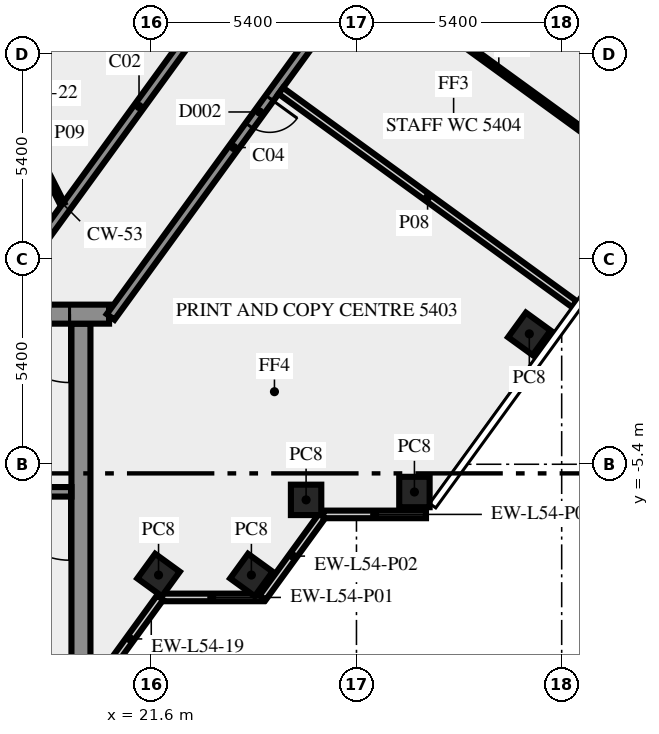
"""IFC4 building model, lengths in metres.
Left out: names, types, materials, properties, quantities, classifications, styles, units other than length and angle.
Written with IfcOpenShell. Run it as: python <this file> out.ifc"""

import sys

from ifc_helpers import new_model, si_unit, direction, frame, frame_2d, origin, origin_2d, place, context, subcontext, project, spatial, rectangle, extrude, element, fill, save


model = new_model("IFC4")
c1 = context("Model", 3, precision=1e-05, world=origin(), true_north=direction((0.0, 1.0)))
c2 = subcontext(c1, "Body", "Model", "MODEL_VIEW")
j1 = project(units=[si_unit("LENGTHUNIT", "METRE"), si_unit("PLANEANGLEUNIT", "RADIAN")], contexts=[c1])
p1 = place(None, origin())
s1 = spatial("IfcSite", under=j1, at=p1, CompositionType="ELEMENT")
p2 = place(p1, origin())
s2 = spatial("IfcBuilding", under=s1, at=p2, CompositionType="ELEMENT")
p3 = place(p2, frame((0.0, 0.0, 230.0)))
s3 = spatial("IfcBuildingStorey", under=s2, at=p3, CompositionType="ELEMENT", Elevation=230.0)
for number, where, z_axis, x_axis in (
    (1, (21.792, -8.315, 0.0), (0.0, 0.0, 1.0), (0.588, 0.809, 0.0)),
    (2, (24.235, -8.315, 0.0), (0.0, 0.0, 1.0), (0.588, 0.809, 0.0)),
    (3, (25.674, -6.337, 0.0), (0.0, 0.0, 1.0), (1.0, 0.0, 0.0)),
    (4, (28.525, -6.13, 0.0), (0.0, 0.0, 1.0), (1.0, 0.0, 0.0)),
    (5, (31.548, -1.969, 0.0), (0.0, 0.0, 1.0), (0.588, 0.809, 0.0)),
):
    element("IfcColumn", number, at=place(p3, frame(where, z_axis=z_axis, x_axis=x_axis)), inside=s3, PredefinedType="COLUMN", context=c2, shape_type="SweptSolid", body=[
        extrude(rectangle(XDim=0.8, YDim=0.8, at=origin_2d()), origin(), (0.0, 0.0, 1.0), 3.65),
    ])
p4 = place(p3, frame((21.843, -8.904, 0.0), z_axis=(0.0, 0.0, 1.0), x_axis=(1.0, 0.0, 0.0)))
e6 = element("IfcWall", 6, at=p4, inside=s3, PredefinedType="SOLIDWALL", context=c2, shape_type="SweptSolid", body=[
    extrude(rectangle(XDim=2.7, YDim=0.2, at=frame_2d((1.35, 0.0))), origin(), (0.0, 0.0, 1.0), 3.65),
])
p5 = place(p3, frame((24.533, -8.909, 0.0), z_axis=(0.0, 0.0, 1.0), x_axis=(0.587720002413, 0.809064397168, 0.0)))
e7 = element("IfcWall", 7, at=p5, inside=s3, PredefinedType="SOLIDWALL", context=c2, shape_type="SweptSolid", body=[
    extrude(rectangle(XDim=2.7, YDim=0.2, at=frame_2d((1.35, 0.0))), origin(), (0.0, 0.0, 1.0), 3.65),
])
p6 = place(p3, frame((26.13, -6.719, 0.0), z_axis=(0.0, 0.0, 1.0), x_axis=(1.0, 0.0, 0.0)))
e8 = element("IfcWall", 8, at=p6, inside=s3, PredefinedType="SOLIDWALL", context=c2, shape_type="SweptSolid", body=[
    extrude(rectangle(XDim=2.7, YDim=0.2, at=frame_2d((1.35, 0.0))), origin(), (0.0, 0.0, 1.0), 3.65),
])
p7 = place(p3, frame((20.253, -11.083, 0.0), z_axis=(0.0, 0.0, 1.0), x_axis=(0.587766567315, 0.809030569476, 0.0)))
e9 = element("IfcWall", 9, at=p7, inside=s3, PredefinedType="SOLIDWALL", context=c2, shape_type="SweptSolid", body=[
    extrude(rectangle(XDim=2.688, YDim=0.2, at=frame_2d((1.344, 0.0))), origin(), (0.0, 0.0, 1.0), 3.65),
])
p8 = place(p3, frame((19.75, -10.5, 0.0), z_axis=(0.0, 0.0, 1.0), x_axis=(0.0, 1.0, 0.0)))
e10 = element("IfcWall", 10, at=p8, inside=s3, PredefinedType="SHEAR", context=c2, shape_type="SweptSolid", body=[
    extrude(rectangle(XDim=8.8, YDim=0.5, at=frame_2d((4.4, 0.0))), origin(), (0.0, 0.0, 1.0), 3.65),
])
p9 = place(p3, frame((19.5, -6.125, 0.0), z_axis=(0.0, 0.0, 1.0), x_axis=(-1.0, 0.0, 0.0)))
e11 = element("IfcWall", 11, at=p9, inside=s3, PredefinedType="SHEAR", context=c2, shape_type="SweptSolid", body=[
    extrude(rectangle(XDim=8.05, YDim=0.25, at=frame_2d((4.025, 0.0))), origin(), (0.0, 0.0, 1.0), 3.65),
])
p10 = place(p9, frame((0.05, 0.0, 0.0)))
e12 = element("IfcOpeningElement", 12, at=p10, cuts=e11, PredefinedType="OPENING", context=c2, shape_type="SweptSolid", body=[
    extrude(rectangle(XDim=1.8, YDim=2.1, at=frame_2d((0.9, 1.05))), frame((0.0, 0.135, 0.0), z_axis=(0.0, -1.0, 0.0), x_axis=(1.0, 0.0, 0.0)), (0.0, 0.0, 1.0), 0.27),
])
p11 = place(p3, frame((20.49, -1.45, 0.0), z_axis=(0.0, 0.0, 1.0), x_axis=(-1.0, 0.0, 0.0)))
e13 = element("IfcWall", 13, at=p11, inside=s3, PredefinedType="SHEAR", context=c2, shape_type="SweptSolid", body=[
    extrude(rectangle(XDim=40.98, YDim=0.5, at=frame_2d((20.49, 0.0))), origin(), (0.0, 0.0, 1.0), 3.65),
])
p12 = place(p11, frame((38.14, 0.0, 0.0)))
e14 = element("IfcOpeningElement", 14, at=p12, cuts=e13, PredefinedType="OPENING", context=c2, shape_type="SweptSolid", body=[
    extrude(rectangle(XDim=1.8, YDim=2.1, at=frame_2d((0.9, 1.05))), frame((0.0, 0.26, 0.0), z_axis=(0.0, -1.0, 0.0), x_axis=(1.0, 0.0, 0.0)), (0.0, 0.0, 1.0), 0.52),
])
p13 = place(p11, frame((36.728, 0.0, 0.0)))
e15 = element("IfcOpeningElement", 15, at=p13, cuts=e13, PredefinedType="OPENING", context=c2, shape_type="SweptSolid", body=[
    extrude(rectangle(XDim=0.8, YDim=2.1, at=frame_2d((0.4, 1.05))), frame((0.0, 0.26, 0.0), z_axis=(0.0, -1.0, 0.0), x_axis=(1.0, 0.0, 0.0)), (0.0, 0.0, 1.0), 0.52),
])
p14 = place(p11, frame((35.153, 0.0, 0.0)))
e16 = element("IfcOpeningElement", 16, at=p14, cuts=e13, PredefinedType="OPENING", context=c2, shape_type="SweptSolid", body=[
    extrude(rectangle(XDim=0.8, YDim=2.1, at=frame_2d((0.4, 1.05))), frame((0.0, 0.26, 0.0), z_axis=(0.0, -1.0, 0.0), x_axis=(1.0, 0.0, 0.0)), (0.0, 0.0, 1.0), 0.52),
])
p15 = place(p11, frame((32.94, 0.0, 0.0)))
e17 = element("IfcOpeningElement", 17, at=p15, cuts=e13, PredefinedType="OPENING", context=c2, shape_type="SweptSolid", body=[
    extrude(rectangle(XDim=0.9, YDim=2.1, at=frame_2d((0.45, 1.05))), frame((0.0, 0.26, 0.0), z_axis=(0.0, -1.0, 0.0), x_axis=(1.0, 0.0, 0.0)), (0.0, 0.0, 1.0), 0.52),
])
p16 = place(p11, frame((29.603, 0.0, 0.0)))
e18 = element("IfcOpeningElement", 18, at=p16, cuts=e13, PredefinedType="OPENING", context=c2, shape_type="SweptSolid", body=[
    extrude(rectangle(XDim=0.9, YDim=2.1, at=frame_2d((0.45, 1.05))), frame((0.0, 0.26, 0.0), z_axis=(0.0, -1.0, 0.0), x_axis=(1.0, 0.0, 0.0)), (0.0, 0.0, 1.0), 0.52),
])
p17 = place(p11, frame((25.877, 0.0, 0.0)))
e19 = element("IfcOpeningElement", 19, at=p17, cuts=e13, PredefinedType="OPENING", context=c2, shape_type="SweptSolid", body=[
    extrude(rectangle(XDim=0.9, YDim=2.1, at=frame_2d((0.45, 1.05))), frame((0.0, 0.26, 0.0), z_axis=(0.0, -1.0, 0.0), x_axis=(1.0, 0.0, 0.0)), (0.0, 0.0, 1.0), 0.52),
])
p18 = place(p11, frame((19.59, 0.0, 0.0)))
e20 = element("IfcOpeningElement", 20, at=p18, cuts=e13, PredefinedType="OPENING", context=c2, shape_type="SweptSolid", body=[
    extrude(rectangle(XDim=2.0, YDim=2.1, at=frame_2d((1.0, 1.05))), frame((0.0, 0.26, 0.0), z_axis=(0.0, -1.0, 0.0), x_axis=(1.0, 0.0, 0.0)), (0.0, 0.0, 1.0), 0.52),
])
p19 = place(p11, frame((7.14, 0.0, 0.0)))
e21 = element("IfcOpeningElement", 21, at=p19, cuts=e13, PredefinedType="OPENING", context=c2, shape_type="SweptSolid", body=[
    extrude(rectangle(XDim=0.9, YDim=2.1, at=frame_2d((0.45, 1.05))), frame((0.0, 0.26, 0.0), z_axis=(0.0, -1.0, 0.0), x_axis=(1.0, 0.0, 0.0)), (0.0, 0.0, 1.0), 0.52),
])
p20 = place(p11, frame((4.19, 0.0, 0.0)))
e22 = element("IfcOpeningElement", 22, at=p20, cuts=e13, PredefinedType="OPENING", context=c2, shape_type="SweptSolid", body=[
    extrude(rectangle(XDim=0.9, YDim=2.1, at=frame_2d((0.45, 1.05))), frame((0.0, 0.26, 0.0), z_axis=(0.0, -1.0, 0.0), x_axis=(1.0, 0.0, 0.0)), (0.0, 0.0, 1.0), 0.52),
])
p21 = place(p11, frame((1.04, 0.0, 0.0)))
e23 = element("IfcOpeningElement", 23, at=p21, cuts=e13, PredefinedType="OPENING", context=c2, shape_type="SweptSolid", body=[
    extrude(rectangle(XDim=1.8, YDim=2.1, at=frame_2d((0.9, 1.05))), frame((0.0, 0.26, 0.0), z_axis=(0.0, -1.0, 0.0), x_axis=(1.0, 0.0, 0.0)), (0.0, 0.0, 1.0), 0.52),
])
p22 = place(p3, frame((17.545, -1.125, 0.0), z_axis=(0.0, 0.0, 1.0), x_axis=(0.587796810203, 0.809008596935, 0.0)))
e24 = element("IfcWall", 24, at=p22, inside=s3, PredefinedType="SOLIDWALL", context=c2, shape_type="SweptSolid", body=[
    extrude(rectangle(XDim=12.703, YDim=0.25, at=frame_2d((6.352, 0.0))), origin(), (0.0, 0.0, 1.0), 3.65),
])
p23 = place(p22, frame((11.329, 0.0, 0.0)))
e25 = element("IfcOpeningElement", 25, at=p23, cuts=e24, PredefinedType="OPENING", context=c2, shape_type="SweptSolid", body=[
    extrude(rectangle(XDim=0.9, YDim=2.1, at=frame_2d((0.45, 1.05))), frame((0.0, 0.135, 0.0), z_axis=(0.0, -1.0, 0.0), x_axis=(1.0, 0.0, 0.0)), (0.0, 0.0, 1.0), 0.27),
])
p24 = place(p3, frame((27.009, 7.392, 0.0), z_axis=(0.0, 0.0, 1.0), x_axis=(-0.587776457057, -0.809023384414, 0.0)))
e26 = element("IfcWall", 26, at=p24, inside=s3, PredefinedType="SOLIDWALL", context=c2, shape_type="SweptSolid", body=[
    extrude(rectangle(XDim=11.021, YDim=0.25, at=frame_2d((5.51, 0.0))), origin(), (0.0, 0.0, 1.0), 3.65),
])
p25 = place(p24, frame((3.905, 0.0, 0.0)))
e27 = element("IfcOpeningElement", 27, at=p25, cuts=e26, PredefinedType="OPENING", context=c2, shape_type="SweptSolid", body=[
    extrude(rectangle(XDim=0.9, YDim=2.1, at=frame_2d((0.45, 1.05))), frame((0.0, 0.135, 0.0), z_axis=(0.0, -1.0, 0.0), x_axis=(1.0, 0.0, 0.0)), (0.0, 0.0, 1.0), 0.27),
])
p26 = place(p24, frame((0.225, 0.0, 0.0)))
e28 = element("IfcOpeningElement", 28, at=p26, cuts=e26, PredefinedType="OPENING", context=c2, shape_type="SweptSolid", body=[
    extrude(rectangle(XDim=0.9, YDim=2.1, at=frame_2d((0.45, 1.05))), frame((0.0, 0.135, 0.0), z_axis=(0.0, -1.0, 0.0), x_axis=(1.0, 0.0, 0.0)), (0.0, 0.0, 1.0), 0.27),
])
p27 = place(p3, frame((27.24, 7.532, 0.0), z_axis=(0.0, 0.0, 1.0), x_axis=(0.809033281668, -0.587762834103, 0.0)))
e29 = element("IfcWall", 29, at=p27, inside=s3, PredefinedType="PARTITIONING", context=c2, shape_type="SweptSolid", body=[
    extrude(rectangle(XDim=8.665, YDim=0.12, at=frame_2d((4.333, 0.0))), origin(), (0.0, 0.0, 1.0), 3.65),
])
p28 = place(p3, frame((32.734, -1.187, 0.0), z_axis=(0.0, 0.0, 1.0), x_axis=(-0.808994684961, 0.587815957341, 0.0)))
e30 = element("IfcWall", 30, at=p28, inside=s3, PredefinedType="SOLIDWALL", context=c2, shape_type="SweptSolid", body=[
    extrude(rectangle(XDim=9.55, YDim=0.2, at=frame_2d((4.775, 0.0))), origin(), (0.0, 0.0, 1.0), 2.85),
])
p29 = place(p3, frame((18.0, 3.925, 0.0), z_axis=(0.0, 0.0, 1.0), x_axis=(0.453950796792, -0.891026752736, 0.0)))
e31 = element("IfcWall", 31, at=p29, inside=s3, PredefinedType="PARTITIONING", context=c2, shape_type="SweptSolid", body=[
    extrude(rectangle(XDim=2.778, YDim=0.12, at=frame_2d((1.389, 0.0))), origin(), (0.0, 0.0, 1.0), 3.65),
])
p30 = place(p10, origin())
e32 = element("IfcDoor", 32, at=p30, inside=s3, OperationType="DOUBLE_DOOR_SINGLE_SWING", PredefinedType="DOOR", context=c2, shape_type="SweptSolid", body=[
    extrude(rectangle(XDim=1.8, YDim=2.1, at=frame_2d((0.9, 1.05))), frame((0.0, 0.025, 0.0), z_axis=(0.0, -1.0, 0.0), x_axis=(1.0, 0.0, 0.0)), (0.0, 0.0, 1.0), 0.05),
])
fill(e12, e32)
p31 = place(p21, origin())
e33 = element("IfcDoor", 33, at=p31, inside=s3, OperationType="DOUBLE_DOOR_SINGLE_SWING", PredefinedType="DOOR", context=c2, shape_type="SweptSolid", body=[
    extrude(rectangle(XDim=1.8, YDim=2.1, at=frame_2d((0.9, 1.05))), frame((0.0, 0.025, 0.0), z_axis=(0.0, -1.0, 0.0), x_axis=(1.0, 0.0, 0.0)), (0.0, 0.0, 1.0), 0.05),
])
fill(e23, e33)
p32 = place(p25, origin())
e34 = element("IfcDoor", 34, at=p32, inside=s3, OperationType="SINGLE_SWING_LEFT", PredefinedType="DOOR", context=c2, shape_type="SweptSolid", body=[
    extrude(rectangle(XDim=0.9, YDim=2.1, at=frame_2d((0.45, 1.05))), frame((0.0, 0.025, 0.0), z_axis=(0.0, -1.0, 0.0), x_axis=(1.0, 0.0, 0.0)), (0.0, 0.0, 1.0), 0.05),
])
fill(e27, e34)
save(model, sys.argv[1])
